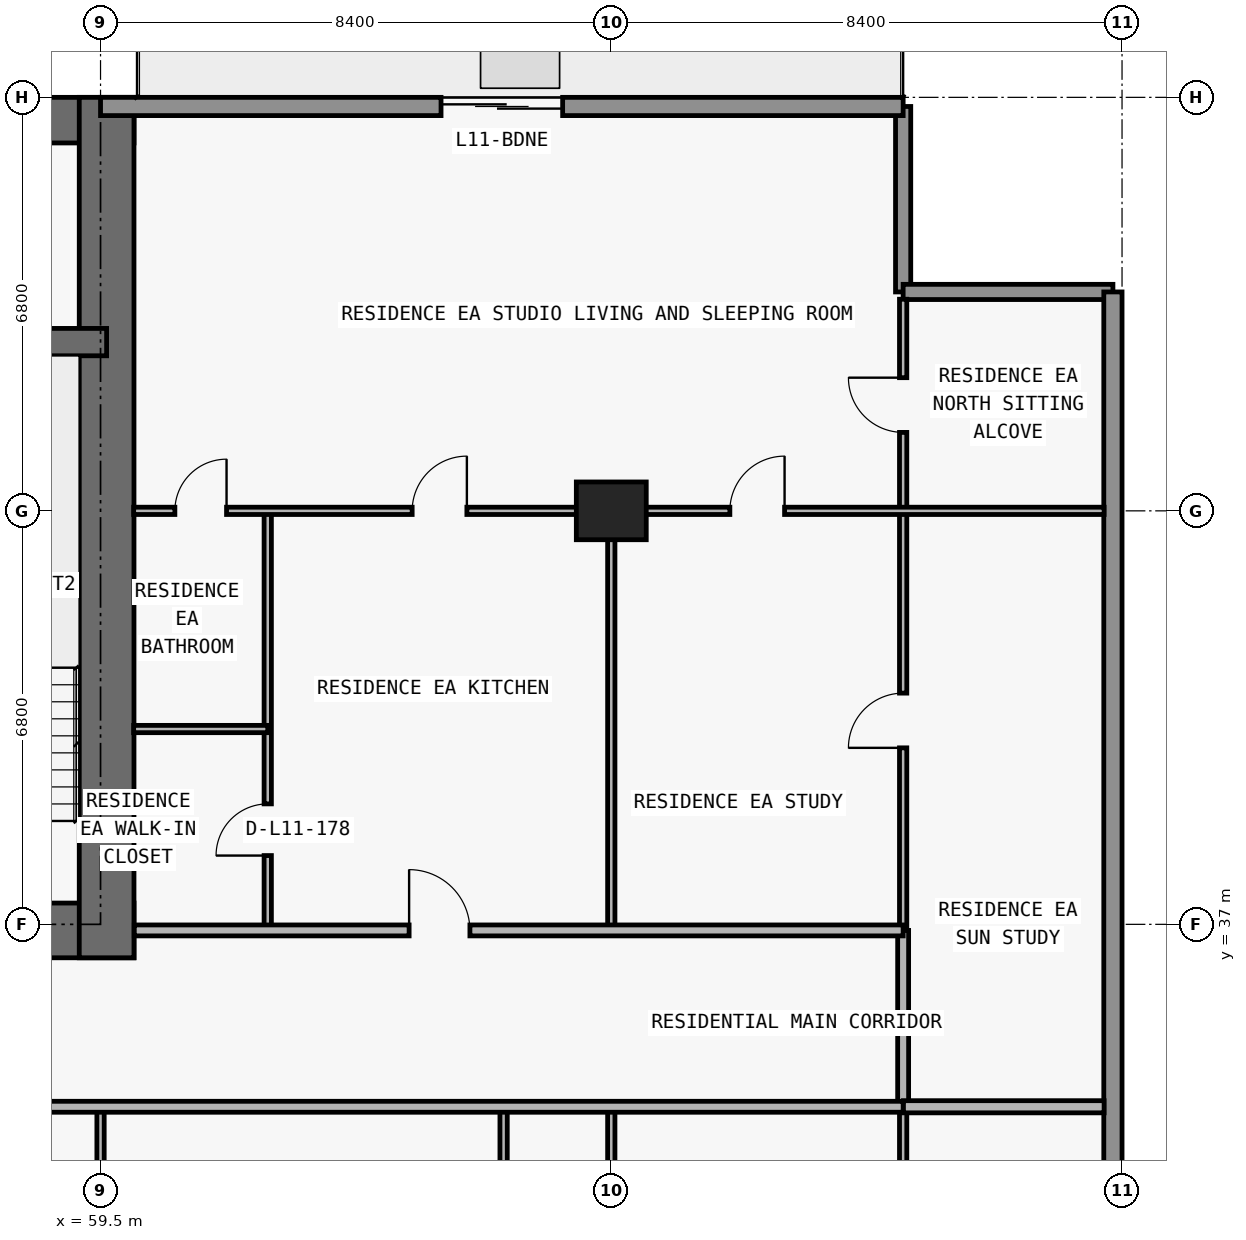
"""IFC4 building model, lengths in metres.
Left out: names, types, materials, properties, quantities, classifications, styles, units other than length and angle.
Written with IfcOpenShell. Run it as: python <this file> out.ifc"""

import sys

from ifc_helpers import new_model, si_unit, direction, frame, frame_2d, origin, origin_2d, place, context, subcontext, project, spatial, rectangle, extrude, element, fill, save


model = new_model("IFC4")
c1 = context("Model", 3, precision=1e-05, world=origin(), true_north=direction((0.0, 1.0)))
c2 = subcontext(c1, "Body", "Model", "MODEL_VIEW")
j1 = project(units=[si_unit("LENGTHUNIT", "METRE"), si_unit("PLANEANGLEUNIT", "RADIAN")], contexts=[c1])
p1 = place(None, origin())
s1 = spatial("IfcSite", under=j1, at=p1, CompositionType="ELEMENT")
p2 = place(p1, origin())
s2 = spatial("IfcBuilding", under=s1, at=p2, CompositionType="ELEMENT")
p3 = place(p2, frame((0.0, 0.0, 46.5)))
s3 = spatial("IfcBuildingStorey", under=s2, at=p3, CompositionType="ELEMENT", Elevation=46.5)
p4 = place(p3, frame((67.9, 43.8, 0.0), z_axis=(0.0, 0.0, 1.0), x_axis=(1.0, 0.0, 0.0)))
e1 = element("IfcColumn", 1, at=p4, inside=s3, PredefinedType="COLUMN", context=c2, shape_type="SweptSolid", body=[
    extrude(rectangle(XDim=1.15, YDim=0.95, at=origin_2d()), origin(), (0.0, 0.0, 1.0), 3.05),
])
p5 = place(p3, frame((17.75, 36.9, 0.0), z_axis=(0.0, 0.0, 1.0), x_axis=(1.0, 0.0, 0.0)))
e2 = element("IfcWall", 2, at=p5, inside=s3, PredefinedType="SHEAR", context=c2, shape_type="SweptSolid", body=[
    extrude(rectangle(XDim=42.3, YDim=0.9, at=frame_2d((21.15, 0.0))), origin(), (0.0, 0.0, 1.0), 3.05),
])
p6 = place(p5, frame((14.55, 0.0, 0.0)))
e3 = element("IfcOpeningElement", 3, at=p6, cuts=e2, PredefinedType="OPENING", context=c2, shape_type="SweptSolid", body=[
    extrude(rectangle(XDim=1.1, YDim=2.15, at=frame_2d((0.55, 1.075))), frame((0.0, 0.46, 0.0), z_axis=(0.0, -1.0, 0.0), x_axis=(1.0, 0.0, 0.0)), (0.0, 0.0, 1.0), 0.92),
])
p7 = place(p5, frame((6.4, 0.0, 0.0)))
e4 = element("IfcOpeningElement", 4, at=p7, cuts=e2, PredefinedType="OPENING", context=c2, shape_type="SweptSolid", body=[
    extrude(rectangle(XDim=1.05, YDim=2.15, at=frame_2d((0.525, 1.075))), frame((0.0, 0.46, 0.0), z_axis=(0.0, -1.0, 0.0), x_axis=(1.0, 0.0, 0.0)), (0.0, 0.0, 1.0), 0.92),
])
p8 = place(p5, frame((34.9, 0.0, 0.0)))
e5 = element("IfcOpeningElement", 5, at=p8, cuts=e2, PredefinedType="OPENING", context=c2, shape_type="SweptSolid", body=[
    extrude(rectangle(XDim=1.05, YDim=2.15, at=frame_2d((0.525, 1.075))), frame((0.0, 0.46, 0.0), z_axis=(0.0, -1.0, 0.0), x_axis=(1.0, 0.0, 0.0)), (0.0, 0.0, 1.0), 0.92),
])
p9 = place(p5, frame((11.012, 0.0, 0.0)))
e6 = element("IfcOpeningElement", 6, at=p9, cuts=e2, PredefinedType="OPENING", context=c2, shape_type="SweptSolid", body=[
    extrude(rectangle(XDim=1.05, YDim=2.15, at=frame_2d((0.525, 1.075))), frame((0.0, 0.46, 0.0), z_axis=(0.0, -1.0, 0.0), x_axis=(1.0, 0.0, 0.0)), (0.0, 0.0, 1.0), 0.92),
])
p10 = place(p5, frame((24.25, 0.0, 0.0)))
e7 = element("IfcOpeningElement", 7, at=p10, cuts=e2, PredefinedType="OPENING", context=c2, shape_type="SweptSolid", body=[
    extrude(rectangle(XDim=1.05, YDim=2.15, at=frame_2d((0.525, 1.075))), frame((0.0, 0.46, 0.0), z_axis=(0.0, -1.0, 0.0), x_axis=(1.0, 0.0, 0.0)), (0.0, 0.0, 1.0), 0.92),
])
p11 = place(p3, frame((17.75, 50.225, 0.0), z_axis=(0.0, 0.0, 1.0), x_axis=(1.0, 0.0, 0.0)))
e8 = element("IfcWall", 8, at=p11, inside=s3, PredefinedType="SHEAR", context=c2, shape_type="SweptSolid", body=[
    extrude(rectangle(XDim=42.3, YDim=0.75, at=frame_2d((21.15, 0.0))), origin(), (0.0, 0.0, 1.0), 3.05),
])
p12 = place(p3, frame((59.6, 36.45, 0.0), z_axis=(0.0, 0.0, 1.0), x_axis=(0.0, 1.0, 0.0)))
e9 = element("IfcWall", 9, at=p12, inside=s3, PredefinedType="SHEAR", context=c2, shape_type="SweptSolid", body=[
    extrude(rectangle(XDim=14.15, YDim=0.9, at=frame_2d((7.075, 0.0))), origin(), (0.0, 0.0, 1.0), 3.05),
])
p13 = place(p3, frame((18.2, 46.575, 0.0), z_axis=(0.0, 0.0, 1.0), x_axis=(1.0, 0.0, 0.0)))
e10 = element("IfcWall", 10, at=p13, inside=s3, PredefinedType="SHEAR", context=c2, shape_type="SweptSolid", body=[
    extrude(rectangle(XDim=41.4, YDim=0.45, at=frame_2d((20.7, 0.0))), origin(), (0.0, 0.0, 1.0), 3.05),
])
p14 = place(p13, frame((7.675, 0.0, 0.0)))
e11 = element("IfcOpeningElement", 11, at=p14, cuts=e10, PredefinedType="OPENING", context=c2, shape_type="SweptSolid", body=[
    extrude(rectangle(XDim=1.05, YDim=2.15, at=frame_2d((0.525, 1.075))), frame((0.0, 0.235, 0.0), z_axis=(0.0, -1.0, 0.0), x_axis=(1.0, 0.0, 0.0)), (0.0, 0.0, 1.0), 0.47),
])
p15 = place(p13, frame((32.725, 0.0, 0.0)))
e12 = element("IfcOpeningElement", 12, at=p15, cuts=e10, PredefinedType="OPENING", context=c2, shape_type="SweptSolid", body=[
    extrude(rectangle(XDim=1.05, YDim=2.15, at=frame_2d((0.525, 1.075))), frame((0.0, 0.235, 0.0), z_axis=(0.0, -1.0, 0.0), x_axis=(1.0, 0.0, 0.0)), (0.0, 0.0, 1.0), 0.47),
])
p16 = place(p3, frame((72.7, 50.45, 0.0), z_axis=(0.0, 0.0, 1.0), x_axis=(0.0, -1.0, 0.0)))
e13 = element("IfcWall", 13, at=p16, inside=s3, PredefinedType="ELEMENTEDWALL", context=c2, shape_type="SweptSolid", body=[
    extrude(rectangle(XDim=3.05, YDim=0.25, at=frame_2d((1.525, 0.0))), origin(), (0.0, 0.0, 1.0), 3.05),
])
p17 = place(p3, frame((72.7, 47.4, 0.0), z_axis=(0.0, 0.0, 1.0), x_axis=(1.0, 0.0, 0.0)))
e14 = element("IfcWall", 14, at=p17, inside=s3, PredefinedType="ELEMENTEDWALL", context=c2, shape_type="SweptSolid", body=[
    extrude(rectangle(XDim=3.45, YDim=0.25, at=frame_2d((1.725, 0.0))), origin(), (0.0, 0.0, 1.0), 3.05),
])
p18 = place(p3, frame((76.15, 47.4, 0.0), z_axis=(0.0, 0.0, 1.0), x_axis=(0.0, -1.0, 0.0)))
e15 = element("IfcWall", 15, at=p18, inside=s3, PredefinedType="STANDARD", context=c2, shape_type="SweptSolid", body=[
    extrude(rectangle(XDim=20.6, YDim=0.3, at=frame_2d((10.3, 0.0))), origin(), (0.0, 0.0, 1.0), 3.05),
])
p19 = place(p3, frame((59.5, 50.45, 0.0), z_axis=(0.0, 0.0, 1.0), x_axis=(1.0, 0.0, 0.0)))
e16 = element("IfcWall", 16, at=p19, inside=s3, PredefinedType="STANDARD", context=c2, shape_type="SweptSolid", body=[
    extrude(rectangle(XDim=13.2, YDim=0.3, at=frame_2d((6.6, 0.0))), origin(), (0.0, 0.0, 1.0), 3.05),
])
p20 = place(p19, frame((5.6, 0.0, 0.0)))
e17 = element("IfcOpeningElement", 17, at=p20, cuts=e16, PredefinedType="OPENING", context=c2, shape_type="SweptSolid", body=[
    extrude(rectangle(XDim=2.0, YDim=2.3, at=frame_2d((1.0, 1.15))), frame((0.0, 0.16, 0.0), z_axis=(0.0, -1.0, 0.0), x_axis=(1.0, 0.0, 0.0)), (0.0, 0.0, 1.0), 0.32),
])
p21 = place(p3, frame((59.5, 28.84, 0.0), z_axis=(0.0, 0.0, 1.0), x_axis=(0.0, 1.0, 0.0)))
e18 = element("IfcWall", 18, at=p21, inside=s3, PredefinedType="PARTITIONING", context=c2, shape_type="SweptSolid", body=[
    extrude(rectangle(XDim=5.16, YDim=0.12, at=frame_2d((2.58, 0.0))), origin(), (0.0, 0.0, 1.0), 2.11),
])
p22 = place(p3, frame((62.25, 36.9, 0.0), z_axis=(0.0, 0.0, 1.0), x_axis=(0.0, 1.0, 0.0)))
e19 = element("IfcWall", 19, at=p22, inside=s3, PredefinedType="PARTITIONING", context=c2, shape_type="SweptSolid", body=[
    extrude(rectangle(XDim=6.9, YDim=0.12, at=frame_2d((3.45, 0.0))), origin(), (0.0, 0.0, 1.0), 3.05),
])
p23 = place(p22, frame((1.231, 0.0, 0.0)))
e20 = element("IfcOpeningElement", 20, at=p23, cuts=e19, PredefinedType="OPENING", context=c2, shape_type="SweptSolid", body=[
    extrude(rectangle(XDim=0.85, YDim=2.1, at=frame_2d((0.425, 1.05))), frame((0.0, 0.07, 0.0), z_axis=(0.0, -1.0, 0.0), x_axis=(1.0, 0.0, 0.0)), (0.0, 0.0, 1.0), 0.14),
])
p24 = place(p3, frame((66.129, 28.84, 0.0), z_axis=(0.0, 0.0, 1.0), x_axis=(0.0, 1.0, 0.0)))
e21 = element("IfcWall", 21, at=p24, inside=s3, PredefinedType="PARTITIONING", context=c2, shape_type="SweptSolid", body=[
    extrude(rectangle(XDim=5.16, YDim=0.12, at=frame_2d((2.58, 0.0))), origin(), (0.0, 0.0, 1.0), 3.05),
])
p25 = place(p24, frame((2.155, 0.0, 0.0)))
e22 = element("IfcOpeningElement", 22, at=p25, cuts=e21, PredefinedType="OPENING", context=c2, shape_type="SweptSolid", body=[
    extrude(rectangle(XDim=0.85, YDim=2.1, at=frame_2d((0.425, 1.05))), frame((0.0, 0.07, 0.0), z_axis=(0.0, -1.0, 0.0), x_axis=(1.0, 0.0, 0.0)), (0.0, 0.0, 1.0), 0.14),
])
p26 = place(p3, frame((67.9, 28.84, 0.0), z_axis=(0.0, 0.0, 1.0), x_axis=(0.0, 1.0, 0.0)))
e23 = element("IfcWall", 23, at=p26, inside=s3, PredefinedType="PARTITIONING", context=c2, shape_type="SweptSolid", body=[
    extrude(rectangle(XDim=5.16, YDim=0.12, at=frame_2d((2.58, 0.0))), origin(), (0.0, 0.0, 1.0), 2.11),
])
p27 = place(p3, frame((67.9, 36.9, 0.0), z_axis=(0.0, 0.0, 1.0), x_axis=(0.0, 1.0, 0.0)))
e24 = element("IfcWall", 24, at=p27, inside=s3, PredefinedType="PARTITIONING", context=c2, shape_type="SweptSolid", body=[
    extrude(rectangle(XDim=6.9, YDim=0.12, at=frame_2d((3.45, 0.0))), origin(), (0.0, 0.0, 1.0), 2.11),
])
p28 = place(p3, frame((72.7, 28.84, 0.0), z_axis=(0.0, 0.0, 1.0), x_axis=(0.0, 1.0, 0.0)))
e25 = element("IfcWall", 25, at=p28, inside=s3, PredefinedType="PARTITIONING", context=c2, shape_type="SweptSolid", body=[
    extrude(rectangle(XDim=5.16, YDim=0.12, at=frame_2d((2.58, 0.0))), origin(), (0.0, 0.0, 1.0), 3.05),
])
p29 = place(p3, frame((72.7, 34.005, 0.0), z_axis=(0.0, 0.0, 1.0), x_axis=(0.0, 1.0, 0.0)))
e26 = element("IfcWall", 26, at=p29, inside=s3, PredefinedType="PARTITIONING", context=c2, shape_type="SweptSolid", body=[
    extrude(rectangle(XDim=2.895, YDim=0.18, at=frame_2d((1.448, 0.0))), origin(), (0.0, 0.0, 1.0), 3.05),
])
p30 = place(p3, frame((72.7, 36.905, 0.0), z_axis=(0.0, 0.0, 1.0), x_axis=(0.0, 1.0, 0.0)))
e27 = element("IfcWall", 27, at=p30, inside=s3, PredefinedType="PARTITIONING", context=c2, shape_type="SweptSolid", body=[
    extrude(rectangle(XDim=10.375, YDim=0.12, at=frame_2d((5.188, 0.0))), origin(), (0.0, 0.0, 1.0), 3.05),
])
p31 = place(p30, frame((2.998, 0.0, 0.0)))
e28 = element("IfcOpeningElement", 28, at=p31, cuts=e27, PredefinedType="OPENING", context=c2, shape_type="SweptSolid", body=[
    extrude(rectangle(XDim=0.9, YDim=2.15, at=frame_2d((0.45, 1.075))), frame((0.0, 0.07, 0.0), z_axis=(0.0, -1.0, 0.0), x_axis=(1.0, 0.0, 0.0)), (0.0, 0.0, 1.0), 0.14),
])
p32 = place(p30, frame((8.185, 0.0, 0.0)))
e29 = element("IfcOpeningElement", 29, at=p32, cuts=e27, PredefinedType="OPENING", context=c2, shape_type="SweptSolid", body=[
    extrude(rectangle(XDim=0.9, YDim=2.15, at=frame_2d((0.45, 1.075))), frame((0.0, 0.07, 0.0), z_axis=(0.0, -1.0, 0.0), x_axis=(1.0, 0.0, 0.0)), (0.0, 0.0, 1.0), 0.14),
])
p33 = place(p3, frame((31.4, 34.0, 0.0), z_axis=(0.0, 0.0, 1.0), x_axis=(1.0, 0.0, 0.0)))
e30 = element("IfcWall", 30, at=p33, inside=s3, PredefinedType="PARTITIONING", context=c2, shape_type="SweptSolid", body=[
    extrude(rectangle(XDim=41.3, YDim=0.18, at=frame_2d((20.65, 0.0))), origin(), (0.0, 0.0, 1.0), 3.05),
])
p34 = place(p33, frame((6.07, 0.0, 0.0)))
e31 = element("IfcOpeningElement", 31, at=p34, cuts=e30, PredefinedType="OPENING", context=c2, shape_type="SweptSolid", body=[
    extrude(rectangle(XDim=1.0, YDim=2.2, at=frame_2d((0.5, 1.1))), frame((0.0, 0.1, 0.0), z_axis=(0.0, -1.0, 0.0), x_axis=(1.0, 0.0, 0.0)), (0.0, 0.0, 1.0), 0.2),
])
p35 = place(p33, frame((13.945, 0.0, 0.0)))
e32 = element("IfcOpeningElement", 32, at=p35, cuts=e30, PredefinedType="OPENING", context=c2, shape_type="SweptSolid", body=[
    extrude(rectangle(XDim=1.0, YDim=2.2, at=frame_2d((0.5, 1.1))), frame((0.0, 0.1, 0.0), z_axis=(0.0, -1.0, 0.0), x_axis=(1.0, 0.0, 0.0)), (0.0, 0.0, 1.0), 0.2),
])
p36 = place(p33, frame((22.414, 0.0, 0.0)))
e33 = element("IfcOpeningElement", 33, at=p36, cuts=e30, PredefinedType="OPENING", context=c2, shape_type="SweptSolid", body=[
    extrude(rectangle(XDim=1.0, YDim=2.2, at=frame_2d((0.5, 1.1))), frame((0.0, 0.1, 0.0), z_axis=(0.0, -1.0, 0.0), x_axis=(1.0, 0.0, 0.0)), (0.0, 0.0, 1.0), 0.2),
])
p37 = place(p3, frame((72.705, 34.0, 0.0), z_axis=(0.0, 0.0, 1.0), x_axis=(1.0, 0.0, 0.0)))
e34 = element("IfcWall", 34, at=p37, inside=s3, PredefinedType="PARTITIONING", context=c2, shape_type="SweptSolid", body=[
    extrude(rectangle(XDim=3.3, YDim=0.2, at=frame_2d((1.65, 0.0))), origin(), (0.0, 0.0, 1.0), 3.05),
])
p38 = place(p3, frame((60.055, 36.9, 0.0), z_axis=(0.0, 0.0, 1.0), x_axis=(1.0, 0.0, 0.0)))
e35 = element("IfcWall", 35, at=p38, inside=s3, PredefinedType="PARTITIONING", context=c2, shape_type="SweptSolid", body=[
    extrude(rectangle(XDim=12.645, YDim=0.18, at=frame_2d((6.323, 0.0))), origin(), (0.0, 0.0, 1.0), 3.05),
])
p39 = place(p38, frame((4.52, 0.0, 0.0)))
e36 = element("IfcOpeningElement", 36, at=p39, cuts=e35, PredefinedType="OPENING", context=c2, shape_type="SweptSolid", body=[
    extrude(rectangle(XDim=1.0, YDim=2.2, at=frame_2d((0.5, 1.1))), frame((0.0, 0.1, 0.0), z_axis=(0.0, -1.0, 0.0), x_axis=(1.0, 0.0, 0.0)), (0.0, 0.0, 1.0), 0.2),
])
p40 = place(p3, frame((60.045, 40.212, 0.0), z_axis=(0.0, 0.0, 1.0), x_axis=(1.0, 0.0, 0.0)))
e37 = element("IfcWall", 37, at=p40, inside=s3, PredefinedType="PARTITIONING", context=c2, shape_type="SweptSolid", body=[
    extrude(rectangle(XDim=2.205, YDim=0.12, at=frame_2d((1.103, 0.0))), origin(), (0.0, 0.0, 1.0), 3.05),
])
p41 = place(p3, frame((60.045, 43.8, 0.0), z_axis=(0.0, 0.0, 1.0), x_axis=(1.0, 0.0, 0.0)))
e38 = element("IfcWall", 38, at=p41, inside=s3, PredefinedType="PARTITIONING", context=c2, shape_type="SweptSolid", body=[
    extrude(rectangle(XDim=15.96, YDim=0.12, at=frame_2d((7.98, 0.0))), origin(), (0.0, 0.0, 1.0), 2.339),
])
p42 = place(p41, frame((9.805, 0.0, 0.0)))
e39 = element("IfcOpeningElement", 39, at=p42, cuts=e38, PredefinedType="OPENING", context=c2, shape_type="SweptSolid", body=[
    extrude(rectangle(XDim=0.9, YDim=2.15, at=frame_2d((0.45, 1.075))), frame((0.0, 0.07, 0.0), z_axis=(0.0, -1.0, 0.0), x_axis=(1.0, 0.0, 0.0)), (0.0, 0.0, 1.0), 0.14),
])
p43 = place(p41, frame((4.58, 0.0, 0.0)))
e40 = element("IfcOpeningElement", 40, at=p43, cuts=e38, PredefinedType="OPENING", context=c2, shape_type="SweptSolid", body=[
    extrude(rectangle(XDim=0.9, YDim=2.15, at=frame_2d((0.45, 1.075))), frame((0.0, 0.07, 0.0), z_axis=(0.0, -1.0, 0.0), x_axis=(1.0, 0.0, 0.0)), (0.0, 0.0, 1.0), 0.14),
])
p44 = place(p41, frame((0.677, 0.0, 0.0)))
e41 = element("IfcOpeningElement", 41, at=p44, cuts=e38, PredefinedType="OPENING", context=c2, shape_type="SweptSolid", body=[
    extrude(rectangle(XDim=0.85, YDim=2.1, at=frame_2d((0.425, 1.05))), frame((0.0, 0.07, 0.0), z_axis=(0.0, -1.0, 0.0), x_axis=(1.0, 0.0, 0.0)), (0.0, 0.0, 1.0), 0.14),
])
p45 = place(p20, origin())
e42 = element("IfcDoor", 42, at=p45, inside=s3, OperationType="DOUBLE_DOOR_SLIDING", PredefinedType="DOOR", context=c2, shape_type="SweptSolid", body=[
    extrude(rectangle(XDim=2.0, YDim=2.3, at=frame_2d((1.0, 1.15))), frame((0.0, 0.025, 0.0), z_axis=(0.0, -1.0, 0.0), x_axis=(1.0, 0.0, 0.0)), (0.0, 0.0, 1.0), 0.05),
])
fill(e17, e42)
p46 = place(p42, origin())
e43 = element("IfcDoor", 43, at=p46, inside=s3, OperationType="SINGLE_SWING_RIGHT", PredefinedType="DOOR", context=c2, shape_type="SweptSolid", body=[
    extrude(rectangle(XDim=0.9, YDim=2.15, at=frame_2d((0.45, 1.075))), frame((0.0, 0.025, 0.0), z_axis=(0.0, -1.0, 0.0), x_axis=(1.0, 0.0, 0.0)), (0.0, 0.0, 1.0), 0.05),
])
fill(e39, e43)
p47 = place(p39, origin())
e44 = element("IfcDoor", 44, at=p47, inside=s3, OperationType="SINGLE_SWING_LEFT", PredefinedType="DOOR", context=c2, shape_type="SweptSolid", body=[
    extrude(rectangle(XDim=1.0, YDim=2.2, at=frame_2d((0.5, 1.1))), frame((0.0, 0.025, 0.0), z_axis=(0.0, -1.0, 0.0), x_axis=(1.0, 0.0, 0.0)), (0.0, 0.0, 1.0), 0.05),
])
fill(e36, e44)
p48 = place(p43, origin())
e45 = element("IfcDoor", 45, at=p48, inside=s3, OperationType="SINGLE_SWING_RIGHT", PredefinedType="DOOR", context=c2, shape_type="SweptSolid", body=[
    extrude(rectangle(XDim=0.9, YDim=2.15, at=frame_2d((0.45, 1.075))), frame((0.0, 0.025, 0.0), z_axis=(0.0, -1.0, 0.0), x_axis=(1.0, 0.0, 0.0)), (0.0, 0.0, 1.0), 0.05),
])
fill(e40, e45)
p49 = place(p23, origin())
e46 = element("IfcDoor", 46, at=p49, inside=s3, OperationType="SINGLE_SWING_LEFT", PredefinedType="DOOR", context=c2, shape_type="SweptSolid", body=[
    extrude(rectangle(XDim=0.85, YDim=2.1, at=frame_2d((0.425, 1.05))), frame((0.0, 0.025, 0.0), z_axis=(0.0, -1.0, 0.0), x_axis=(1.0, 0.0, 0.0)), (0.0, 0.0, 1.0), 0.05),
])
fill(e20, e46)
p50 = place(p44, origin())
e47 = element("IfcDoor", 47, at=p50, inside=s3, OperationType="SINGLE_SWING_RIGHT", PredefinedType="DOOR", context=c2, shape_type="SweptSolid", body=[
    extrude(rectangle(XDim=0.85, YDim=2.1, at=frame_2d((0.425, 1.05))), frame((0.0, 0.025, 0.0), z_axis=(0.0, -1.0, 0.0), x_axis=(1.0, 0.0, 0.0)), (0.0, 0.0, 1.0), 0.05),
])
fill(e41, e47)
p51 = place(p31, origin())
e48 = element("IfcDoor", 48, at=p51, inside=s3, OperationType="SINGLE_SWING_LEFT", PredefinedType="DOOR", context=c2, shape_type="SweptSolid", body=[
    extrude(rectangle(XDim=0.9, YDim=2.15, at=frame_2d((0.45, 1.075))), frame((0.0, 0.025, 0.0), z_axis=(0.0, -1.0, 0.0), x_axis=(1.0, 0.0, 0.0)), (0.0, 0.0, 1.0), 0.05),
])
fill(e28, e48)
p52 = place(p32, origin())
e49 = element("IfcDoor", 49, at=p52, inside=s3, OperationType="SINGLE_SWING_RIGHT", PredefinedType="DOOR", context=c2, shape_type="SweptSolid", body=[
    extrude(rectangle(XDim=0.9, YDim=2.15, at=frame_2d((0.45, 1.075))), frame((0.0, 0.025, 0.0), z_axis=(0.0, -1.0, 0.0), x_axis=(1.0, 0.0, 0.0)), (0.0, 0.0, 1.0), 0.05),
])
fill(e29, e49)
save(model, sys.argv[1])
